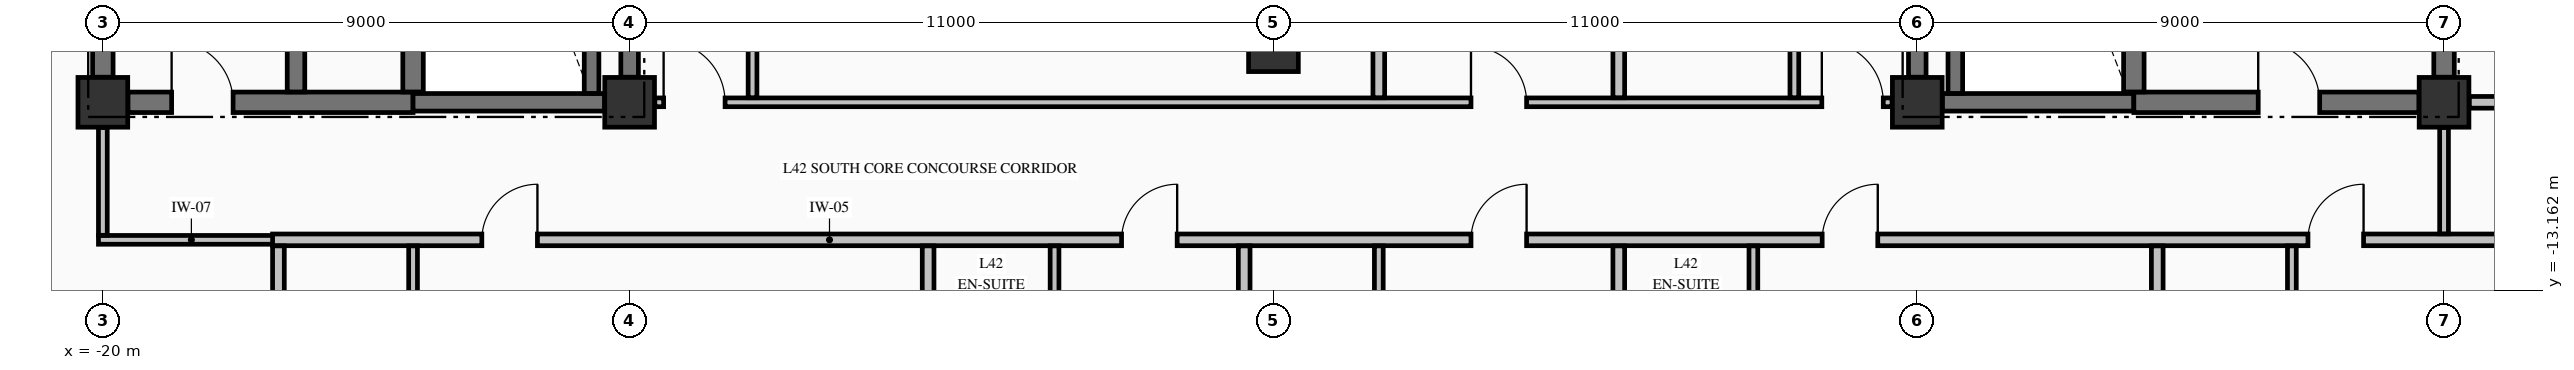
"""IFC4 building model, lengths in metres.
Left out: names, types, materials, properties, quantities, classifications, styles, units other than length and angle.
Written with IfcOpenShell. Run it as: python <this file> out.ifc"""

import sys

from ifc_helpers import new_model, si_unit, direction, frame, frame_2d, origin, origin_2d, place, context, subcontext, project, spatial, rectangle, extrude, element, fill, save


model = new_model("IFC4")
c1 = context("Model", 3, precision=1e-05, world=origin(), true_north=direction((0.0, 1.0)))
c2 = subcontext(c1, "Body", "Model", "MODEL_VIEW")
j1 = project(units=[si_unit("LENGTHUNIT", "METRE"), si_unit("PLANEANGLEUNIT", "RADIAN")], contexts=[c1])
p1 = place(None, origin())
s1 = spatial("IfcSite", under=j1, at=p1, CompositionType="ELEMENT")
p2 = place(p1, origin())
s2 = spatial("IfcBuilding", under=s1, at=p2, CompositionType="ELEMENT")
p3 = place(p2, frame((0.0, 0.0, 166.06)))
s3 = spatial("IfcBuildingStorey", under=s2, at=p3, CompositionType="ELEMENT", Elevation=166.06)
for number, where, z_axis, x_axis in (
    (1, (-20.0, -9.95, -0.25), (0.0, 0.0, 1.0), (1.0, 0.0, 0.0)),
    (2, (-11.0, -9.95, -0.25), (0.0, 0.0, 1.0), (1.0, 0.0, 0.0)),
    (3, (11.0, -9.95, -0.25), (0.0, 0.0, 1.0), (1.0, 0.0, 0.0)),
    (4, (20.0, -9.95, -0.25), (0.0, 0.0, 1.0), (1.0, 0.0, 0.0)),
    (5, (0.0, -9.0, -0.25), (0.0, 0.0, 1.0), (1.0, 0.0, 0.0)),
):
    element("IfcColumn", number, at=place(p3, frame(where, z_axis=z_axis, x_axis=x_axis)), inside=s3, PredefinedType="COLUMN", context=c2, shape_type="SweptSolid", body=[
        extrude(rectangle(XDim=0.85, YDim=0.85, at=origin_2d()), origin(), (0.0, 0.0, 1.0), 3.4),
    ])
p4 = place(p3, frame((-19.571, -9.95, 0.0), z_axis=(0.0, 0.0, 1.0), x_axis=(1.0, 0.0, 0.0)))
e6 = element("IfcWall", 6, at=p4, inside=s3, PredefinedType="SHEAR", context=c2, shape_type="SweptSolid", body=[
    extrude(rectangle(XDim=4.871, YDim=0.35, at=frame_2d((2.436, 0.0))), origin(), (0.0, 0.0, 1.0), 3.15),
])
p5 = place(p4, frame((0.746, 0.0, 0.0)))
e7 = element("IfcOpeningElement", 7, at=p5, cuts=e6, PredefinedType="OPENING", context=c2, shape_type="SweptSolid", body=[
    extrude(rectangle(XDim=1.05, YDim=2.15, at=frame_2d((0.525, 1.075))), frame((0.0, 0.185, 0.0), z_axis=(0.0, -1.0, 0.0), x_axis=(1.0, 0.0, 0.0)), (0.0, 0.0, 1.0), 0.37),
])
for number, where, z_axis, x_axis in (
    (8, (-14.7, -9.95, 0.0), (0.0, 0.0, 1.0), (1.0, 0.0, 0.0)),
    (9, (11.429, -9.95, 0.0), (0.0, 0.0, 1.0), (1.0, 0.0, 0.0)),
):
    element("IfcWall", number, at=place(p3, frame(where, z_axis=z_axis, x_axis=x_axis)), inside=s3, PredefinedType="SHEAR", context=c2, shape_type="SweptSolid", body=[
        extrude(rectangle(XDim=3.271, YDim=0.3, at=frame_2d((1.635, 0.0))), origin(), (0.0, 0.0, 1.0), 3.15),
    ])
p6 = place(p3, frame((14.7, -9.95, 0.0), z_axis=(0.0, 0.0, 1.0), x_axis=(1.0, 0.0, 0.0)))
e10 = element("IfcWall", 10, at=p6, inside=s3, PredefinedType="SHEAR", context=c2, shape_type="SweptSolid", body=[
    extrude(rectangle(XDim=4.871, YDim=0.35, at=frame_2d((2.436, 0.0))), origin(), (0.0, 0.0, 1.0), 3.15),
])
p7 = place(p6, frame((2.125, 0.0, 0.0)))
e11 = element("IfcOpeningElement", 11, at=p7, cuts=e10, PredefinedType="OPENING", context=c2, shape_type="SweptSolid", body=[
    extrude(rectangle(XDim=1.05, YDim=2.15, at=frame_2d((0.525, 1.075))), frame((0.0, 0.185, 0.0), z_axis=(0.0, -1.0, 0.0), x_axis=(1.0, 0.0, 0.0)), (0.0, 0.0, 1.0), 0.37),
])
p8 = place(p3, frame((-20.075, -12.3, 0.0), z_axis=(0.0, 0.0, 1.0), x_axis=(1.0, 0.0, 0.0)))
e12 = element("IfcWall", 12, at=p8, inside=s3, PredefinedType="PARTITIONING", context=c2, shape_type="SweptSolid", body=[
    extrude(rectangle(XDim=3.175, YDim=0.15, at=frame_2d((1.587, 0.0))), origin(), (0.0, 0.0, 1.0), 3.15),
])
p9 = place(p3, frame((-17.1, -12.3, 0.0), z_axis=(0.0, 0.0, 1.0), x_axis=(1.0, 0.0, 0.0)))
e13 = element("IfcWall", 13, at=p9, inside=s3, PredefinedType="PARTITIONING", context=c2, shape_type="SweptSolid", body=[
    extrude(rectangle(XDim=39.2, YDim=0.2, at=frame_2d((19.6, 0.0))), origin(), (0.0, 0.0, 1.0), 3.15),
])
p10 = place(p9, frame((3.575, 0.0, 0.0)))
e14 = element("IfcOpeningElement", 14, at=p10, cuts=e13, PredefinedType="OPENING", context=c2, shape_type="SweptSolid", body=[
    extrude(rectangle(XDim=0.95, YDim=2.15, at=frame_2d((0.475, 1.075))), frame((0.0, 0.11, 0.0), z_axis=(0.0, -1.0, 0.0), x_axis=(1.0, 0.0, 0.0)), (0.0, 0.0, 1.0), 0.22),
])
p11 = place(p9, frame((14.505, 0.0, 0.0)))
e15 = element("IfcOpeningElement", 15, at=p11, cuts=e13, PredefinedType="OPENING", context=c2, shape_type="SweptSolid", body=[
    extrude(rectangle(XDim=0.95, YDim=2.15, at=frame_2d((0.475, 1.075))), frame((0.0, 0.11, 0.0), z_axis=(0.0, -1.0, 0.0), x_axis=(1.0, 0.0, 0.0)), (0.0, 0.0, 1.0), 0.22),
])
p12 = place(p9, frame((20.475, 0.0, 0.0)))
e16 = element("IfcOpeningElement", 16, at=p12, cuts=e13, PredefinedType="OPENING", context=c2, shape_type="SweptSolid", body=[
    extrude(rectangle(XDim=0.95, YDim=2.15, at=frame_2d((0.475, 1.075))), frame((0.0, 0.11, 0.0), z_axis=(0.0, -1.0, 0.0), x_axis=(1.0, 0.0, 0.0)), (0.0, 0.0, 1.0), 0.22),
])
p13 = place(p9, frame((26.475, 0.0, 0.0)))
e17 = element("IfcOpeningElement", 17, at=p13, cuts=e13, PredefinedType="OPENING", context=c2, shape_type="SweptSolid", body=[
    extrude(rectangle(XDim=0.95, YDim=2.15, at=frame_2d((0.475, 1.075))), frame((0.0, 0.11, 0.0), z_axis=(0.0, -1.0, 0.0), x_axis=(1.0, 0.0, 0.0)), (0.0, 0.0, 1.0), 0.22),
])
p14 = place(p9, frame((34.775, 0.0, 0.0)))
e18 = element("IfcOpeningElement", 18, at=p14, cuts=e13, PredefinedType="OPENING", context=c2, shape_type="SweptSolid", body=[
    extrude(rectangle(XDim=0.95, YDim=2.15, at=frame_2d((0.475, 1.075))), frame((0.0, 0.11, 0.0), z_axis=(0.0, -1.0, 0.0), x_axis=(1.0, 0.0, 0.0)), (0.0, 0.0, 1.0), 0.22),
])
p15 = place(p3, frame((-10.569, -9.95, 0.0), z_axis=(0.0, 0.0, 1.0), x_axis=(1.0, 0.0, 0.0)))
e19 = element("IfcWall", 19, at=p15, inside=s3, PredefinedType="PARTITIONING", context=c2, shape_type="SweptSolid", body=[
    extrude(rectangle(XDim=21.138, YDim=0.15, at=frame_2d((10.569, 0.0))), origin(), (0.0, 0.0, 1.0), 3.15),
])
p16 = place(p15, frame((0.15, 0.0, 0.0)))
e20 = element("IfcOpeningElement", 20, at=p16, cuts=e19, PredefinedType="OPENING", context=c2, shape_type="SweptSolid", body=[
    extrude(rectangle(XDim=1.05, YDim=2.15, at=frame_2d((0.525, 1.075))), frame((0.0, 0.085, 0.0), z_axis=(0.0, -1.0, 0.0), x_axis=(1.0, 0.0, 0.0)), (0.0, 0.0, 1.0), 0.17),
])
p17 = place(p15, frame((19.938, 0.0, 0.0)))
e21 = element("IfcOpeningElement", 21, at=p17, cuts=e19, PredefinedType="OPENING", context=c2, shape_type="SweptSolid", body=[
    extrude(rectangle(XDim=1.05, YDim=2.15, at=frame_2d((0.525, 1.075))), frame((0.0, 0.085, 0.0), z_axis=(0.0, -1.0, 0.0), x_axis=(1.0, 0.0, 0.0)), (0.0, 0.0, 1.0), 0.17),
])
p18 = place(p15, frame((13.944, 0.0, 0.0)))
e22 = element("IfcOpeningElement", 22, at=p18, cuts=e19, PredefinedType="OPENING", context=c2, shape_type="SweptSolid", body=[
    extrude(rectangle(XDim=0.95, YDim=2.15, at=frame_2d((0.475, 1.075))), frame((0.0, 0.085, 0.0), z_axis=(0.0, -1.0, 0.0), x_axis=(1.0, 0.0, 0.0)), (0.0, 0.0, 1.0), 0.17),
])
p19 = place(p3, frame((20.431, -9.95, 0.0), z_axis=(0.0, 0.0, 1.0), x_axis=(1.0, 0.0, 0.0)))
e23 = element("IfcWall", 23, at=p19, inside=s3, PredefinedType="PARTITIONING", context=c2, shape_type="SweptSolid", body=[
    extrude(rectangle(XDim=6.404, YDim=0.2, at=frame_2d((3.202, 0.0))), origin(), (0.0, 0.0, 1.0), 3.15),
])
p20 = place(p3, frame((-20.0, -9.521, 0.0), z_axis=(0.0, 0.0, 1.0), x_axis=(0.0, 1.0, 0.0)))
e24 = element("IfcWall", 24, at=p20, inside=s3, PredefinedType="SHEAR", context=c2, shape_type="SweptSolid", body=[
    extrude(rectangle(XDim=9.092, YDim=0.35, at=frame_2d((4.546, 0.0))), origin(), (0.0, 0.0, 1.0), 3.15),
])
p21 = place(p3, frame((-16.7, -9.773, 0.0), z_axis=(0.0, 0.0, 1.0), x_axis=(0.0, 1.0, 0.0)))
e25 = element("IfcWall", 25, at=p21, inside=s3, PredefinedType="SHEAR", context=c2, shape_type="SweptSolid", body=[
    extrude(rectangle(XDim=9.371, YDim=0.3, at=frame_2d((4.686, 0.0))), origin(), (0.0, 0.0, 1.0), 3.15),
])
p22 = place(p3, frame((-14.7, -9.773, 0.0), z_axis=(0.0, 0.0, 1.0), x_axis=(0.0, 1.0, 0.0)))
e26 = element("IfcWall", 26, at=p22, inside=s3, PredefinedType="SHEAR", context=c2, shape_type="SweptSolid", body=[
    extrude(rectangle(XDim=9.371, YDim=0.35, at=frame_2d((4.686, 0.0))), origin(), (0.0, 0.0, 1.0), 3.15),
])
p23 = place(p3, frame((-11.65, -9.798, 0.0), z_axis=(0.0, 0.0, 1.0), x_axis=(0.0, 1.0, 0.0)))
e27 = element("IfcWall", 27, at=p23, inside=s3, PredefinedType="SOLIDWALL", context=c2, shape_type="SweptSolid", body=[
    extrude(rectangle(XDim=9.396, YDim=0.25, at=frame_2d((4.698, 0.0))), origin(), (0.0, 0.0, 1.0), 3.15),
])
for number, where, z_axis, x_axis in (
    (28, (-11.0, -9.521, 0.0), (0.0, 0.0, 1.0), (0.0, 1.0, 0.0)),
    (29, (11.0, -9.521, 0.0), (0.0, 0.0, 1.0), (0.0, 1.0, 0.0)),
):
    element("IfcWall", number, at=place(p3, frame(where, z_axis=z_axis, x_axis=x_axis)), inside=s3, PredefinedType="SHEAR", context=c2, shape_type="SweptSolid", body=[
        extrude(rectangle(XDim=9.092, YDim=0.3, at=frame_2d((4.546, 0.0))), origin(), (0.0, 0.0, 1.0), 3.15),
    ])
p24 = place(p3, frame((11.65, -9.798, 0.0), z_axis=(0.0, 0.0, 1.0), x_axis=(0.0, 1.0, 0.0)))
e30 = element("IfcWall", 30, at=p24, inside=s3, PredefinedType="SOLIDWALL", context=c2, shape_type="SweptSolid", body=[
    extrude(rectangle(XDim=9.396, YDim=0.25, at=frame_2d((4.698, 0.0))), origin(), (0.0, 0.0, 1.0), 3.15),
])
p25 = place(p3, frame((14.7, -9.773, 0.0), z_axis=(0.0, 0.0, 1.0), x_axis=(0.0, 1.0, 0.0)))
e31 = element("IfcWall", 31, at=p25, inside=s3, PredefinedType="SHEAR", context=c2, shape_type="SweptSolid", body=[
    extrude(rectangle(XDim=9.371, YDim=0.35, at=frame_2d((4.686, 0.0))), origin(), (0.0, 0.0, 1.0), 3.15),
])
p26 = place(p3, frame((20.0, -9.521, 0.0), z_axis=(0.0, 0.0, 1.0), x_axis=(0.0, 1.0, 0.0)))
e32 = element("IfcWall", 32, at=p26, inside=s3, PredefinedType="SHEAR", context=c2, shape_type="SweptSolid", body=[
    extrude(rectangle(XDim=9.092, YDim=0.35, at=frame_2d((4.546, 0.0))), origin(), (0.0, 0.0, 1.0), 3.15),
])
p27 = place(p3, frame((-20.0, -12.222, 0.0), z_axis=(0.0, 0.0, 1.0), x_axis=(0.0, 1.0, 0.0)))
e33 = element("IfcWall", 33, at=p27, inside=s3, PredefinedType="PARTITIONING", context=c2, shape_type="SweptSolid", body=[
    extrude(rectangle(XDim=1.841, YDim=0.15, at=frame_2d((0.92, 0.0))), origin(), (0.0, 0.0, 1.0), 2.342),
])
p28 = place(p3, frame((-17.0, -14.472, 0.0), z_axis=(0.0, 0.0, 1.0), x_axis=(0.0, 1.0, 0.0)))
e34 = element("IfcWall", 34, at=p28, inside=s3, PredefinedType="PARTITIONING", context=c2, shape_type="SweptSolid", body=[
    extrude(rectangle(XDim=2.069, YDim=0.2, at=frame_2d((1.034, 0.0))), origin(), (0.0, 0.0, 1.0), 3.15),
])
p29 = place(p3, frame((-14.7, -14.472, 0.0), z_axis=(0.0, 0.0, 1.0), x_axis=(0.0, 1.0, 0.0)))
e35 = element("IfcWall", 35, at=p29, inside=s3, PredefinedType="PARTITIONING", context=c2, shape_type="SweptSolid", body=[
    extrude(rectangle(XDim=2.069, YDim=0.15, at=frame_2d((1.034, 0.0))), origin(), (0.0, 0.0, 1.0), 3.15),
])
p30 = place(p3, frame((-8.9, -9.872, 0.0), z_axis=(0.0, 0.0, 1.0), x_axis=(0.0, 1.0, 0.0)))
e36 = element("IfcWall", 36, at=p30, inside=s3, PredefinedType="PARTITIONING", context=c2, shape_type="SweptSolid", body=[
    extrude(rectangle(XDim=6.369, YDim=0.15, at=frame_2d((3.185, 0.0))), origin(), (0.0, 0.0, 1.0), 3.15),
])
p31 = place(p30, frame((2.702, 0.0, 0.0)))
e37 = element("IfcOpeningElement", 37, at=p31, cuts=e36, PredefinedType="OPENING", context=c2, shape_type="SweptSolid", body=[
    extrude(rectangle(XDim=1.0, YDim=2.15, at=frame_2d((0.5, 1.075))), frame((0.0, 0.085, 0.0), z_axis=(0.0, -1.0, 0.0), x_axis=(1.0, 0.0, 0.0)), (0.0, 0.0, 1.0), 0.17),
])
p32 = place(p3, frame((-5.9, -15.172, 0.0), z_axis=(0.0, 0.0, 1.0), x_axis=(0.0, 1.0, 0.0)))
e38 = element("IfcWall", 38, at=p32, inside=s3, PredefinedType="PARTITIONING", context=c2, shape_type="SweptSolid", body=[
    extrude(rectangle(XDim=2.769, YDim=0.2, at=frame_2d((1.385, 0.0))), origin(), (0.0, 0.0, 1.0), 3.15),
])
p33 = place(p3, frame((-3.74, -15.172, 0.0), z_axis=(0.0, 0.0, 1.0), x_axis=(0.0, 1.0, 0.0)))
e39 = element("IfcWall", 39, at=p33, inside=s3, PredefinedType="PARTITIONING", context=c2, shape_type="SweptSolid", body=[
    extrude(rectangle(XDim=2.769, YDim=0.15, at=frame_2d((1.385, 0.0))), origin(), (0.0, 0.0, 1.0), 3.15),
])
p34 = place(p3, frame((-0.5, -14.472, 0.0), z_axis=(0.0, 0.0, 1.0), x_axis=(0.0, 1.0, 0.0)))
e40 = element("IfcWall", 40, at=p34, inside=s3, PredefinedType="PARTITIONING", context=c2, shape_type="SweptSolid", body=[
    extrude(rectangle(XDim=2.069, YDim=0.2, at=frame_2d((1.034, 0.0))), origin(), (0.0, 0.0, 1.0), 3.15),
])
p35 = place(p3, frame((1.8, -14.472, 0.0), z_axis=(0.0, 0.0, 1.0), x_axis=(0.0, 1.0, 0.0)))
e41 = element("IfcWall", 41, at=p35, inside=s3, PredefinedType="PARTITIONING", context=c2, shape_type="SweptSolid", body=[
    extrude(rectangle(XDim=2.069, YDim=0.15, at=frame_2d((1.034, 0.0))), origin(), (0.0, 0.0, 1.0), 3.15),
])
p36 = place(p3, frame((1.8, -9.872, 0.0), z_axis=(0.0, 0.0, 1.0), x_axis=(0.0, 1.0, 0.0)))
e42 = element("IfcWall", 42, at=p36, inside=s3, PredefinedType="PARTITIONING", context=c2, shape_type="SweptSolid", body=[
    extrude(rectangle(XDim=4.569, YDim=0.2, at=frame_2d((2.285, 0.0))), origin(), (0.0, 0.0, 1.0), 3.15),
])
p37 = place(p3, frame((5.9, -15.172, 0.0), z_axis=(0.0, 0.0, 1.0), x_axis=(0.0, 1.0, 0.0)))
e43 = element("IfcWall", 43, at=p37, inside=s3, PredefinedType="PARTITIONING", context=c2, shape_type="SweptSolid", body=[
    extrude(rectangle(XDim=2.769, YDim=0.2, at=frame_2d((1.385, 0.0))), origin(), (0.0, 0.0, 1.0), 3.15),
])
p38 = place(p3, frame((5.9, -9.872, 0.0), z_axis=(0.0, 0.0, 1.0), x_axis=(0.0, 1.0, 0.0)))
e44 = element("IfcWall", 44, at=p38, inside=s3, PredefinedType="PARTITIONING", context=c2, shape_type="SweptSolid", body=[
    extrude(rectangle(XDim=4.569, YDim=0.2, at=frame_2d((2.285, 0.0))), origin(), (0.0, 0.0, 1.0), 3.15),
])
p39 = place(p3, frame((8.2, -15.172, 0.0), z_axis=(0.0, 0.0, 1.0), x_axis=(0.0, 1.0, 0.0)))
e45 = element("IfcWall", 45, at=p39, inside=s3, PredefinedType="PARTITIONING", context=c2, shape_type="SweptSolid", body=[
    extrude(rectangle(XDim=2.769, YDim=0.15, at=frame_2d((1.385, 0.0))), origin(), (0.0, 0.0, 1.0), 3.15),
])
p40 = place(p3, frame((8.9, -9.872, 0.0), z_axis=(0.0, 0.0, 1.0), x_axis=(0.0, 1.0, 0.0)))
e46 = element("IfcWall", 46, at=p40, inside=s3, PredefinedType="PARTITIONING", context=c2, shape_type="SweptSolid", body=[
    extrude(rectangle(XDim=4.569, YDim=0.15, at=frame_2d((2.285, 0.0))), origin(), (0.0, 0.0, 1.0), 3.15),
])
p41 = place(p40, frame((1.847, 0.0, 0.0)))
e47 = element("IfcOpeningElement", 47, at=p41, cuts=e46, PredefinedType="OPENING", context=c2, shape_type="SweptSolid", body=[
    extrude(rectangle(XDim=0.95, YDim=2.15, at=frame_2d((0.475, 1.075))), frame((0.0, 0.085, 0.0), z_axis=(0.0, -1.0, 0.0), x_axis=(1.0, 0.0, 0.0)), (0.0, 0.0, 1.0), 0.17),
])
p42 = place(p3, frame((15.1, -14.472, 0.0), z_axis=(0.0, 0.0, 1.0), x_axis=(0.0, 1.0, 0.0)))
e48 = element("IfcWall", 48, at=p42, inside=s3, PredefinedType="PARTITIONING", context=c2, shape_type="SweptSolid", body=[
    extrude(rectangle(XDim=2.069, YDim=0.2, at=frame_2d((1.034, 0.0))), origin(), (0.0, 0.0, 1.0), 3.15),
])
p43 = place(p3, frame((17.4, -14.472, 0.0), z_axis=(0.0, 0.0, 1.0), x_axis=(0.0, 1.0, 0.0)))
e49 = element("IfcWall", 49, at=p43, inside=s3, PredefinedType="PARTITIONING", context=c2, shape_type="SweptSolid", body=[
    extrude(rectangle(XDim=2.069, YDim=0.15, at=frame_2d((1.034, 0.0))), origin(), (0.0, 0.0, 1.0), 3.15),
])
p44 = place(p3, frame((20.0, -12.197, 0.0), z_axis=(0.0, 0.0, 1.0), x_axis=(0.0, 1.0, 0.0)))
e50 = element("IfcWall", 50, at=p44, inside=s3, PredefinedType="PARTITIONING", context=c2, shape_type="SweptSolid", body=[
    extrude(rectangle(XDim=1.816, YDim=0.15, at=frame_2d((0.908, 0.0))), origin(), (0.0, 0.0, 1.0), 2.342),
])
p45 = place(p5, origin())
e51 = element("IfcDoor", 51, at=p45, inside=s3, OperationType="SINGLE_SWING_LEFT", PredefinedType="DOOR", context=c2, shape_type="SweptSolid", body=[
    extrude(rectangle(XDim=1.05, YDim=2.15, at=frame_2d((0.525, 1.075))), frame((0.0, 0.025, 0.0), z_axis=(0.0, -1.0, 0.0), x_axis=(1.0, 0.0, 0.0)), (0.0, 0.0, 1.0), 0.05),
])
fill(e7, e51)
p46 = place(p7, origin())
e52 = element("IfcDoor", 52, at=p46, inside=s3, OperationType="SINGLE_SWING_LEFT", PredefinedType="DOOR", context=c2, shape_type="SweptSolid", body=[
    extrude(rectangle(XDim=1.05, YDim=2.15, at=frame_2d((0.525, 1.075))), frame((0.0, 0.025, 0.0), z_axis=(0.0, -1.0, 0.0), x_axis=(1.0, 0.0, 0.0)), (0.0, 0.0, 1.0), 0.05),
])
fill(e11, e52)
p47 = place(p16, origin())
e53 = element("IfcDoor", 53, at=p47, inside=s3, OperationType="SINGLE_SWING_LEFT", PredefinedType="DOOR", context=c2, shape_type="SweptSolid", body=[
    extrude(rectangle(XDim=1.05, YDim=2.15, at=frame_2d((0.525, 1.075))), frame((0.0, 0.025, 0.0), z_axis=(0.0, -1.0, 0.0), x_axis=(1.0, 0.0, 0.0)), (0.0, 0.0, 1.0), 0.05),
])
fill(e20, e53)
p48 = place(p17, origin())
e54 = element("IfcDoor", 54, at=p48, inside=s3, OperationType="SINGLE_SWING_LEFT", PredefinedType="DOOR", context=c2, shape_type="SweptSolid", body=[
    extrude(rectangle(XDim=1.05, YDim=2.15, at=frame_2d((0.525, 1.075))), frame((0.0, 0.025, 0.0), z_axis=(0.0, -1.0, 0.0), x_axis=(1.0, 0.0, 0.0)), (0.0, 0.0, 1.0), 0.05),
])
fill(e21, e54)
p49 = place(p10, origin())
e55 = element("IfcDoor", 55, at=p49, inside=s3, OperationType="SINGLE_SWING_RIGHT", PredefinedType="DOOR", context=c2, shape_type="SweptSolid", body=[
    extrude(rectangle(XDim=0.95, YDim=2.15, at=frame_2d((0.475, 1.075))), frame((0.0, 0.025, 0.0), z_axis=(0.0, -1.0, 0.0), x_axis=(1.0, 0.0, 0.0)), (0.0, 0.0, 1.0), 0.05),
])
fill(e14, e55)
p50 = place(p11, origin())
e56 = element("IfcDoor", 56, at=p50, inside=s3, OperationType="SINGLE_SWING_RIGHT", PredefinedType="DOOR", context=c2, shape_type="SweptSolid", body=[
    extrude(rectangle(XDim=0.95, YDim=2.15, at=frame_2d((0.475, 1.075))), frame((0.0, 0.025, 0.0), z_axis=(0.0, -1.0, 0.0), x_axis=(1.0, 0.0, 0.0)), (0.0, 0.0, 1.0), 0.05),
])
fill(e15, e56)
p51 = place(p12, origin())
e57 = element("IfcDoor", 57, at=p51, inside=s3, OperationType="SINGLE_SWING_RIGHT", PredefinedType="DOOR", context=c2, shape_type="SweptSolid", body=[
    extrude(rectangle(XDim=0.95, YDim=2.15, at=frame_2d((0.475, 1.075))), frame((0.0, 0.025, 0.0), z_axis=(0.0, -1.0, 0.0), x_axis=(1.0, 0.0, 0.0)), (0.0, 0.0, 1.0), 0.05),
])
fill(e16, e57)
p52 = place(p13, origin())
e58 = element("IfcDoor", 58, at=p52, inside=s3, OperationType="SINGLE_SWING_RIGHT", PredefinedType="DOOR", context=c2, shape_type="SweptSolid", body=[
    extrude(rectangle(XDim=0.95, YDim=2.15, at=frame_2d((0.475, 1.075))), frame((0.0, 0.025, 0.0), z_axis=(0.0, -1.0, 0.0), x_axis=(1.0, 0.0, 0.0)), (0.0, 0.0, 1.0), 0.05),
])
fill(e17, e58)
p53 = place(p14, origin())
e59 = element("IfcDoor", 59, at=p53, inside=s3, OperationType="SINGLE_SWING_RIGHT", PredefinedType="DOOR", context=c2, shape_type="SweptSolid", body=[
    extrude(rectangle(XDim=0.95, YDim=2.15, at=frame_2d((0.475, 1.075))), frame((0.0, 0.025, 0.0), z_axis=(0.0, -1.0, 0.0), x_axis=(1.0, 0.0, 0.0)), (0.0, 0.0, 1.0), 0.05),
])
fill(e18, e59)
p54 = place(p18, origin())
e60 = element("IfcDoor", 60, at=p54, inside=s3, OperationType="SINGLE_SWING_LEFT", PredefinedType="DOOR", context=c2, shape_type="SweptSolid", body=[
    extrude(rectangle(XDim=0.95, YDim=2.15, at=frame_2d((0.475, 1.075))), frame((0.0, 0.025, 0.0), z_axis=(0.0, -1.0, 0.0), x_axis=(1.0, 0.0, 0.0)), (0.0, 0.0, 1.0), 0.05),
])
fill(e22, e60)
save(model, sys.argv[1])
